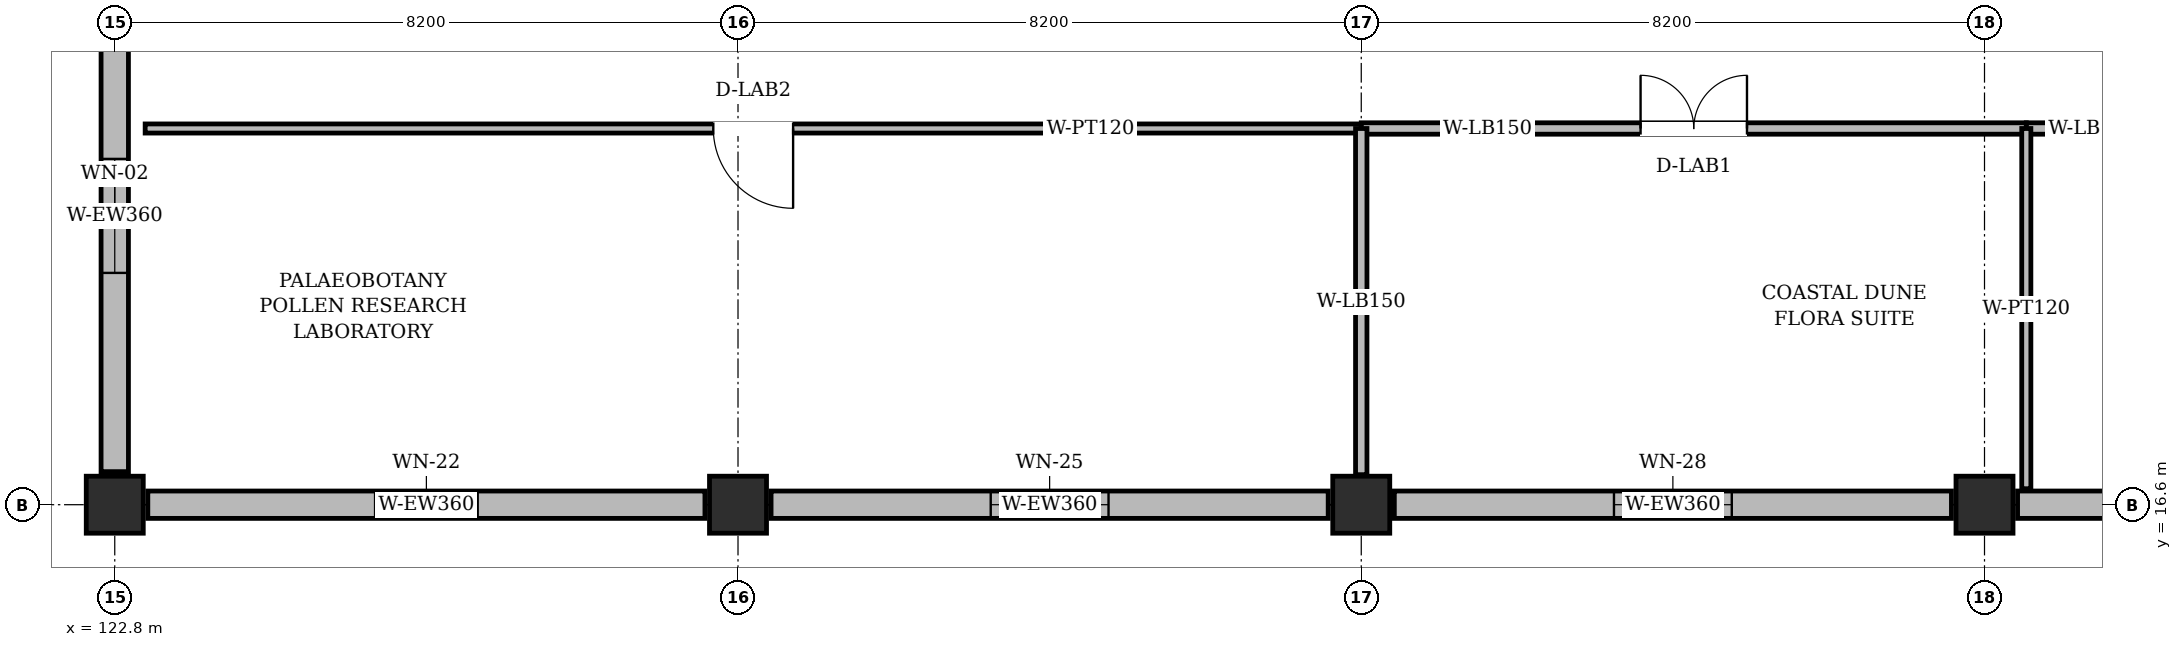
"""IFC4 building model, lengths in metres.
Left out: names, types, materials, properties, quantities, classifications, styles, units other than length and angle.
Written with IfcOpenShell. Run it as: python <this file> out.ifc"""

import sys

from ifc_helpers import new_model, si_unit, direction, frame, frame_2d, origin, origin_2d, place, context, subcontext, project, spatial, rectangle, extrude, element, fill, save


model = new_model("IFC4")
c1 = context("Model", 3, precision=1e-05, world=origin(), true_north=direction((0.0, 1.0)))
c2 = subcontext(c1, "Body", "Model", "MODEL_VIEW")
j1 = project(units=[si_unit("LENGTHUNIT", "METRE"), si_unit("PLANEANGLEUNIT", "RADIAN")], contexts=[c1])
p1 = place(None, origin())
s1 = spatial("IfcSite", under=j1, at=p1, CompositionType="ELEMENT")
p2 = place(p1, origin())
s2 = spatial("IfcBuilding", under=s1, at=p2, CompositionType="ELEMENT")
p3 = place(p2, frame((0.0, 0.0, 57.6)))
s3 = spatial("IfcBuildingStorey", under=s2, at=p3, CompositionType="ELEMENT", Elevation=57.6)
for number, where, z_axis, x_axis in (
    (1, (122.8, 16.6, 0.0), (0.0, 0.0, 1.0), (1.0, 0.0, 0.0)),
    (2, (131.0, 16.6, 0.0), (0.0, 0.0, 1.0), (1.0, 0.0, 0.0)),
    (3, (139.2, 16.6, 0.0), (0.0, 0.0, 1.0), (1.0, 0.0, 0.0)),
    (4, (147.4, 16.6, 0.0), (0.0, 0.0, 1.0), (1.0, 0.0, 0.0)),
):
    element("IfcColumn", number, at=place(p3, frame(where, z_axis=z_axis, x_axis=x_axis)), inside=s3, PredefinedType="COLUMN", context=c2, shape_type="SweptSolid", body=[
        extrude(rectangle(XDim=0.75, YDim=0.75, at=origin_2d()), origin(), (0.0, 0.0, 1.0), 3.92),
    ])
p4 = place(p3, frame((123.235, 16.6, 0.0), z_axis=(0.0, 0.0, 1.0), x_axis=(1.0, 0.0, 0.0)))
e5 = element("IfcWall", 5, at=p4, inside=s3, PredefinedType="SOLIDWALL", context=c2, shape_type="SweptSolid", body=[
    extrude(rectangle(XDim=7.33, YDim=0.36, at=frame_2d((3.665, 0.0))), origin(), (0.0, 0.0, 1.0), 3.305),
])
p5 = place(p4, frame((2.99, 0.0, 0.95)))
e6 = element("IfcOpeningElement", 6, at=p5, cuts=e5, PredefinedType="OPENING", context=c2, shape_type="SweptSolid", body=[
    extrude(rectangle(XDim=1.35, YDim=1.5, at=frame_2d((0.675, 0.75))), frame((0.0, 0.192, 0.0), z_axis=(0.0, -1.0, 0.0), x_axis=(1.0, 0.0, 0.0)), (0.0, 0.0, 1.0), 0.384),
])
p6 = place(p3, frame((131.435, 16.6, 0.0), z_axis=(0.0, 0.0, 1.0), x_axis=(1.0, 0.0, 0.0)))
e7 = element("IfcWall", 7, at=p6, inside=s3, PredefinedType="SOLIDWALL", context=c2, shape_type="SweptSolid", body=[
    extrude(rectangle(XDim=7.33, YDim=0.36, at=frame_2d((3.665, 0.0))), origin(), (0.0, 0.0, 1.0), 3.305),
])
p7 = place(p6, frame((2.89, 0.0, 0.95)))
e8 = element("IfcOpeningElement", 8, at=p7, cuts=e7, PredefinedType="OPENING", context=c2, shape_type="SweptSolid", body=[
    extrude(rectangle(XDim=1.55, YDim=1.25, at=frame_2d((0.775, 0.625))), frame((0.0, 0.192, 0.0), z_axis=(0.0, -1.0, 0.0), x_axis=(1.0, 0.0, 0.0)), (0.0, 0.0, 1.0), 0.384),
])
p8 = place(p3, frame((139.635, 16.6, 0.0), z_axis=(0.0, 0.0, 1.0), x_axis=(1.0, 0.0, 0.0)))
e9 = element("IfcWall", 9, at=p8, inside=s3, PredefinedType="SOLIDWALL", context=c2, shape_type="SweptSolid", body=[
    extrude(rectangle(XDim=7.33, YDim=0.36, at=frame_2d((3.665, 0.0))), origin(), (0.0, 0.0, 1.0), 3.305),
])
p9 = place(p8, frame((2.89, 0.0, 0.95)))
e10 = element("IfcOpeningElement", 10, at=p9, cuts=e9, PredefinedType="OPENING", context=c2, shape_type="SweptSolid", body=[
    extrude(rectangle(XDim=1.55, YDim=2.05, at=frame_2d((0.775, 1.025))), frame((0.0, 0.192, 0.0), z_axis=(0.0, -1.0, 0.0), x_axis=(1.0, 0.0, 0.0)), (0.0, 0.0, 1.0), 0.384),
])
p10 = place(p3, frame((147.835, 16.6, 0.0), z_axis=(0.0, 0.0, 1.0), x_axis=(1.0, 0.0, 0.0)))
e11 = element("IfcWall", 11, at=p10, inside=s3, PredefinedType="SOLIDWALL", context=c2, shape_type="SweptSolid", body=[
    extrude(rectangle(XDim=7.33, YDim=0.36, at=frame_2d((3.665, 0.0))), origin(), (0.0, 0.0, 1.0), 3.305),
])
p11 = place(p10, frame((3.29, 0.0, 0.95)))
e12 = element("IfcOpeningElement", 12, at=p11, cuts=e11, PredefinedType="OPENING", context=c2, shape_type="SweptSolid", body=[
    extrude(rectangle(XDim=0.75, YDim=1.8, at=frame_2d((0.375, 0.9))), frame((0.0, 0.192, 0.0), z_axis=(0.0, -1.0, 0.0), x_axis=(1.0, 0.0, 0.0)), (0.0, 0.0, 1.0), 0.384),
])
p12 = place(p3, frame((122.8, 23.765, 0.0), z_axis=(0.0, 0.0, 1.0), x_axis=(0.0, -1.0, 0.0)))
e13 = element("IfcWall", 13, at=p12, inside=s3, PredefinedType="SOLIDWALL", context=c2, shape_type="SweptSolid", body=[
    extrude(rectangle(XDim=6.73, YDim=0.36, at=frame_2d((3.365, 0.0))), origin(), (0.0, 0.0, 1.0), 3.305),
])
p13 = place(p12, frame((2.615, 0.0, 0.95)))
e14 = element("IfcOpeningElement", 14, at=p13, cuts=e13, PredefinedType="OPENING", context=c2, shape_type="SweptSolid", body=[
    extrude(rectangle(XDim=1.5, YDim=2.1, at=frame_2d((0.75, 1.05))), frame((0.0, 0.192, 0.0), z_axis=(0.0, -1.0, 0.0), x_axis=(1.0, 0.0, 0.0)), (0.0, 0.0, 1.0), 0.384),
])
p14 = place(p3, frame((139.2, 21.55, 0.0), z_axis=(0.0, 0.0, 1.0), x_axis=(-1.0, 0.0, 0.0)))
e15 = element("IfcWall", 15, at=p14, inside=s3, PredefinedType="PARTITIONING", context=c2, shape_type="SweptSolid", body=[
    extrude(rectangle(XDim=16.0, YDim=0.12, at=frame_2d((8.0, 0.0))), origin(), (0.0, 0.0, 1.0), 3.565),
])
p15 = place(p14, frame((7.475, 0.0, 0.0)))
e16 = element("IfcOpeningElement", 16, at=p15, cuts=e15, PredefinedType="OPENING", context=c2, shape_type="SweptSolid", body=[
    extrude(rectangle(XDim=1.05, YDim=2.2, at=frame_2d((0.525, 1.1))), frame((0.0, 0.072, 0.0), z_axis=(0.0, -1.0, 0.0), x_axis=(1.0, 0.0, 0.0)), (0.0, 0.0, 1.0), 0.144),
])
p16 = place(p3, frame((147.95, 21.55, 0.0), z_axis=(0.0, 0.0, 1.0), x_axis=(-1.0, 0.0, 0.0)))
e17 = element("IfcWall", 17, at=p16, inside=s3, PredefinedType="PARTITIONING", context=c2, shape_type="SweptSolid", body=[
    extrude(rectangle(XDim=8.75, YDim=0.15, at=frame_2d((4.375, 0.0))), origin(), (0.0, 0.0, 1.0), 3.495),
])
p17 = place(p16, frame((3.675, 0.0, 0.0)))
e18 = element("IfcOpeningElement", 18, at=p17, cuts=e17, PredefinedType="OPENING", context=c2, shape_type="SweptSolid", body=[
    extrude(rectangle(XDim=1.4, YDim=2.2, at=frame_2d((0.7, 1.1))), frame((0.0, 0.087, 0.0), z_axis=(0.0, -1.0, 0.0), x_axis=(1.0, 0.0, 0.0)), (0.0, 0.0, 1.0), 0.174),
])
p18 = place(p3, frame((149.7, 21.55, 0.0), z_axis=(0.0, 0.0, 1.0), x_axis=(-1.0, 0.0, 0.0)))
e19 = element("IfcWall", 19, at=p18, inside=s3, PredefinedType="PARTITIONING", context=c2, shape_type="SweptSolid", body=[
    extrude(rectangle(XDim=1.75, YDim=0.15, at=frame_2d((0.875, 0.0))), origin(), (0.0, 0.0, 1.0), 3.495),
])
p19 = place(p3, frame((139.2, 21.55, 0.0), z_axis=(0.0, 0.0, 1.0), x_axis=(0.0, -1.0, 0.0)))
e20 = element("IfcWall", 20, at=p19, inside=s3, PredefinedType="PARTITIONING", context=c2, shape_type="SweptSolid", body=[
    extrude(rectangle(XDim=4.555, YDim=0.15, at=frame_2d((2.277, 0.0))), origin(), (0.0, 0.0, 1.0), 3.255),
])
p20 = place(p3, frame((147.95, 21.55, 0.0), z_axis=(0.0, 0.0, 1.0), x_axis=(0.0, -1.0, 0.0)))
e21 = element("IfcWall", 21, at=p20, inside=s3, PredefinedType="PARTITIONING", context=c2, shape_type="SweptSolid", body=[
    extrude(rectangle(XDim=4.74, YDim=0.12, at=frame_2d((2.37, 0.0))), origin(), (0.0, 0.0, 1.0), 3.805),
])
p21 = place(p5, origin())
e22 = element("IfcWindow", 22, at=p21, inside=s3, PartitioningType="SINGLE_PANEL", PredefinedType="WINDOW", context=c2, shape_type="SweptSolid", body=[
    extrude(rectangle(XDim=1.35, YDim=1.5, at=frame_2d((0.675, 0.75))), frame((0.0, 0.03, 0.0), z_axis=(0.0, -1.0, 0.0), x_axis=(1.0, 0.0, 0.0)), (0.0, 0.0, 1.0), 0.06),
])
fill(e6, e22)
p22 = place(p7, origin())
e23 = element("IfcWindow", 23, at=p22, inside=s3, PartitioningType="DOUBLE_PANEL_VERTICAL", PredefinedType="WINDOW", context=c2, shape_type="SweptSolid", body=[
    extrude(rectangle(XDim=1.55, YDim=1.25, at=frame_2d((0.775, 0.625))), frame((0.0, 0.03, 0.0), z_axis=(0.0, -1.0, 0.0), x_axis=(1.0, 0.0, 0.0)), (0.0, 0.0, 1.0), 0.06),
])
fill(e8, e23)
p23 = place(p9, origin())
e24 = element("IfcWindow", 24, at=p23, inside=s3, PartitioningType="DOUBLE_PANEL_VERTICAL", PredefinedType="WINDOW", context=c2, shape_type="SweptSolid", body=[
    extrude(rectangle(XDim=1.55, YDim=2.05, at=frame_2d((0.775, 1.025))), frame((0.0, 0.03, 0.0), z_axis=(0.0, -1.0, 0.0), x_axis=(1.0, 0.0, 0.0)), (0.0, 0.0, 1.0), 0.06),
])
fill(e10, e24)
p24 = place(p13, origin())
e25 = element("IfcWindow", 25, at=p24, inside=s3, PartitioningType="DOUBLE_PANEL_VERTICAL", PredefinedType="WINDOW", context=c2, shape_type="SweptSolid", body=[
    extrude(rectangle(XDim=1.5, YDim=2.1, at=frame_2d((0.75, 1.05))), frame((0.0, 0.03, 0.0), z_axis=(0.0, -1.0, 0.0), x_axis=(1.0, 0.0, 0.0)), (0.0, 0.0, 1.0), 0.06),
])
fill(e14, e25)
p25 = place(p15, origin())
e26 = element("IfcDoor", 26, at=p25, inside=s3, OperationType="SINGLE_SWING_LEFT", PredefinedType="DOOR", context=c2, shape_type="SweptSolid", body=[
    extrude(rectangle(XDim=1.05, YDim=2.2, at=frame_2d((0.525, 1.1))), frame((0.0, 0.025, 0.0), z_axis=(0.0, -1.0, 0.0), x_axis=(1.0, 0.0, 0.0)), (0.0, 0.0, 1.0), 0.05),
])
fill(e16, e26)
p26 = place(p17, frame((1.4, 0.0, 0.0), z_axis=(0.0, 0.0, 1.0), x_axis=(-1.0, 0.0, 0.0)))
e27 = element("IfcDoor", 27, at=p26, inside=s3, OperationType="DOUBLE_DOOR_SINGLE_SWING", PredefinedType="DOOR", context=c2, shape_type="SweptSolid", body=[
    extrude(rectangle(XDim=1.4, YDim=2.2, at=frame_2d((0.7, 1.1))), frame((0.0, 0.025, 0.0), z_axis=(0.0, -1.0, 0.0), x_axis=(1.0, 0.0, 0.0)), (0.0, 0.0, 1.0), 0.05),
])
fill(e18, e27)
save(model, sys.argv[1])
